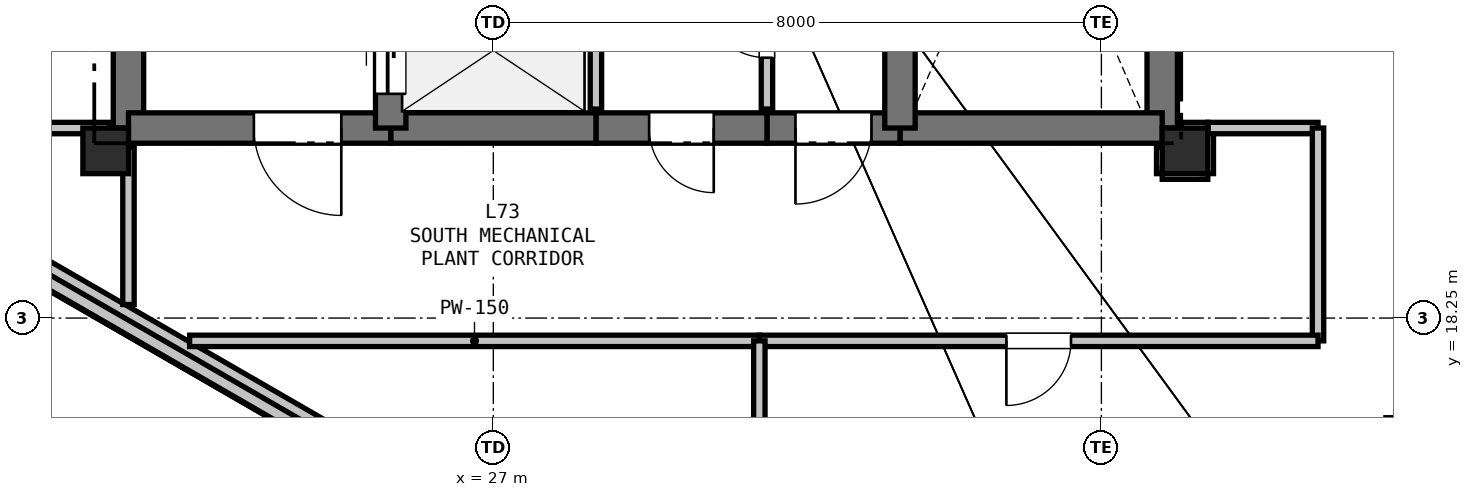
"""IFC4 building model, lengths in metres.
Left out: names, types, materials, properties, quantities, classifications, styles, units other than length and angle.
Written with IfcOpenShell. Run it as: python <this file> out.ifc"""

import sys

from ifc_helpers import new_model, si_unit, direction, frame, frame_2d, origin, origin_2d, place, context, subcontext, project, spatial, rectangle, extrude, element, fill, save


model = new_model("IFC4")
c1 = context("Model", 3, precision=1e-05, world=origin(), true_north=direction((0.0, 1.0)))
c2 = subcontext(c1, "Body", "Model", "MODEL_VIEW")
j1 = project(units=[si_unit("LENGTHUNIT", "METRE"), si_unit("PLANEANGLEUNIT", "RADIAN")], contexts=[c1])
p1 = place(None, origin())
s1 = spatial("IfcSite", under=j1, at=p1, CompositionType="ELEMENT")
p2 = place(p1, origin())
s2 = spatial("IfcBuilding", under=s1, at=p2, CompositionType="ELEMENT")
p3 = place(p2, frame((0.0, 0.0, 264.0)))
s3 = spatial("IfcBuildingStorey", under=s2, at=p3, CompositionType="ELEMENT", Elevation=264.0)
for number, where, z_axis, x_axis in (
    (1, (21.9, 20.45, 0.0), (0.0, 0.0, 1.0), (1.0, 0.0, 0.0)),
    (2, (36.1, 20.45, 0.0), (0.0, 0.0, 1.0), (1.0, 0.0, 0.0)),
):
    element("IfcColumn", number, at=place(p3, frame(where, z_axis=z_axis, x_axis=x_axis)), inside=s3, PredefinedType="COLUMN", context=c2, shape_type="SweptSolid", body=[
        extrude(rectangle(XDim=0.6, YDim=0.6, at=origin_2d()), origin(), (0.0, 0.0, 1.0), 2.6),
    ])
p4 = place(p3, frame((36.525, 10.0, 0.0), z_axis=(0.0, 0.0, 1.0), x_axis=(-0.866023553042, 0.500003205566, 0.0)))
e3 = element("IfcWall", 3, at=p4, inside=s3, PredefinedType="SOLIDWALL", context=c2, shape_type="SweptSolid", body=[
    extrude(rectangle(XDim=29.783, YDim=0.225, at=frame_2d((14.892, 0.0))), origin(), (0.0, 0.0, 1.0), 2.25),
])
p5 = place(p3, frame((36.525, 9.851, 2.7), z_axis=(0.0, 0.0, 1.0), x_axis=(-0.866024093284, 0.500002269847, 0.0)))
e4 = element("IfcWall", 4, at=p5, inside=s3, PredefinedType="PARAPET", context=c2, shape_type="SweptSolid", body=[
    extrude(rectangle(XDim=29.933, YDim=0.175, at=frame_2d((14.967, 0.0))), origin(), (0.0, 0.0, 1.0), 1.2),
])
p6 = place(p3, frame((22.2, 20.75, 0.0), z_axis=(0.0, 0.0, 1.0), x_axis=(0.0, 1.0, 0.0)))
e5 = element("IfcWall", 5, at=p6, inside=s3, PredefinedType="SHEAR", context=c2, shape_type="SweptSolid", body=[
    extrude(rectangle(XDim=4.65, YDim=0.4, at=frame_2d((2.325, 0.0))), origin(), (0.0, 0.0, 1.0), 2.6),
])
p7 = place(p3, frame((35.8, 28.1, 0.0), z_axis=(0.0, 0.0, 1.0), x_axis=(0.0, -1.0, 0.0)))
e6 = element("IfcWall", 6, at=p7, inside=s3, PredefinedType="SHEAR", context=c2, shape_type="SweptSolid", body=[
    extrude(rectangle(XDim=7.35, YDim=0.4, at=frame_2d((3.675, 0.0))), origin(), (0.0, 0.0, 1.0), 2.6),
])
p8 = place(p3, frame((35.8, 20.75, 0.0), z_axis=(0.0, 0.0, 1.0), x_axis=(-1.0, 0.0, 0.0)))
e7 = element("IfcWall", 7, at=p8, inside=s3, PredefinedType="SHEAR", context=c2, shape_type="SweptSolid", body=[
    extrude(rectangle(XDim=3.45, YDim=0.4, at=frame_2d((1.725, 0.0))), origin(), (0.0, 0.0, 1.0), 2.6),
])
p9 = place(p3, frame((32.35, 20.75, 0.0), z_axis=(0.0, 0.0, 1.0), x_axis=(-1.0, 0.0, 0.0)))
e8 = element("IfcWall", 8, at=p9, inside=s3, PredefinedType="SHEAR", context=c2, shape_type="SweptSolid", body=[
    extrude(rectangle(XDim=1.75, YDim=0.4, at=frame_2d((0.875, 0.0))), origin(), (0.0, 0.0, 1.0), 2.6),
])
p10 = place(p9, frame((0.375, 0.0, 0.0)))
e9 = element("IfcOpeningElement", 9, at=p10, cuts=e8, PredefinedType="OPENING", context=c2, shape_type="SweptSolid", body=[
    extrude(rectangle(XDim=1.0, YDim=2.15, at=frame_2d((0.5, 1.075))), frame((0.0, 0.21, 0.0), z_axis=(0.0, -1.0, 0.0), x_axis=(1.0, 0.0, 0.0)), (0.0, 0.0, 1.0), 0.42),
])
p11 = place(p3, frame((30.6, 20.75, 0.0), z_axis=(0.0, 0.0, 1.0), x_axis=(-1.0, 0.0, 0.0)))
e10 = element("IfcWall", 10, at=p11, inside=s3, PredefinedType="SHEAR", context=c2, shape_type="SweptSolid", body=[
    extrude(rectangle(XDim=2.25, YDim=0.4, at=frame_2d((1.125, 0.0))), origin(), (0.0, 0.0, 1.0), 2.6),
])
p12 = place(p11, frame((0.7, 0.0, 0.0)))
e11 = element("IfcOpeningElement", 11, at=p12, cuts=e10, PredefinedType="OPENING", context=c2, shape_type="SweptSolid", body=[
    extrude(rectangle(XDim=0.85, YDim=2.1, at=frame_2d((0.425, 1.05))), frame((0.0, 0.21, 0.0), z_axis=(0.0, -1.0, 0.0), x_axis=(1.0, 0.0, 0.0)), (0.0, 0.0, 1.0), 0.42),
])
p13 = place(p3, frame((28.35, 20.75, 0.0), z_axis=(0.0, 0.0, 1.0), x_axis=(-1.0, 0.0, 0.0)))
e12 = element("IfcWall", 12, at=p13, inside=s3, PredefinedType="SHEAR", context=c2, shape_type="SweptSolid", body=[
    extrude(rectangle(XDim=2.7, YDim=0.4, at=frame_2d((1.35, 0.0))), origin(), (0.0, 0.0, 1.0), 2.6),
])
p14 = place(p3, frame((25.65, 20.75, 0.0), z_axis=(0.0, 0.0, 1.0), x_axis=(-1.0, 0.0, 0.0)))
e13 = element("IfcWall", 13, at=p14, inside=s3, PredefinedType="SHEAR", context=c2, shape_type="SweptSolid", body=[
    extrude(rectangle(XDim=3.45, YDim=0.4, at=frame_2d((1.725, 0.0))), origin(), (0.0, 0.0, 1.0), 2.6),
])
p15 = place(p14, frame((0.65, 0.0, 0.0)))
e14 = element("IfcOpeningElement", 14, at=p15, cuts=e13, PredefinedType="OPENING", context=c2, shape_type="SweptSolid", body=[
    extrude(rectangle(XDim=1.15, YDim=2.15, at=frame_2d((0.575, 1.075))), frame((0.0, 0.21, 0.0), z_axis=(0.0, -1.0, 0.0), x_axis=(1.0, 0.0, 0.0)), (0.0, 0.0, 1.0), 0.42),
])
p16 = place(p3, frame((25.65, 20.75, 0.0), z_axis=(0.0, 0.0, 1.0), x_axis=(0.0, 1.0, 0.0)))
e15 = element("IfcWall", 15, at=p16, inside=s3, PredefinedType="SHEAR", context=c2, shape_type="SweptSolid", body=[
    extrude(rectangle(XDim=2.0, YDim=0.4, at=frame_2d((1.0, 0.0))), origin(), (0.0, 0.0, 1.0), 2.6),
])
p17 = place(p16, frame((0.45, 0.0, 0.0)))
e16 = element("IfcOpeningElement", 16, at=p17, cuts=e15, PredefinedType="OPENING", context=c2, shape_type="SweptSolid", body=[
    extrude(rectangle(XDim=1.1, YDim=2.15, at=frame_2d((0.55, 1.075))), frame((0.0, 0.21, 0.0), z_axis=(0.0, -1.0, 0.0), x_axis=(1.0, 0.0, 0.0)), (0.0, 0.0, 1.0), 0.42),
])
p18 = place(p3, frame((32.35, 20.75, 0.0), z_axis=(0.0, 0.0, 1.0), x_axis=(0.0, 1.0, 0.0)))
e17 = element("IfcWall", 17, at=p18, inside=s3, PredefinedType="SHEAR", context=c2, shape_type="SweptSolid", body=[
    extrude(rectangle(XDim=4.8, YDim=0.4, at=frame_2d((2.4, 0.0))), origin(), (0.0, 0.0, 1.0), 2.6),
])
p19 = place(p3, frame((28.35, 23.2, 0.0), z_axis=(0.0, 0.0, 1.0), x_axis=(0.0, -1.0, 0.0)))
e18 = element("IfcWall", 18, at=p19, inside=s3, PredefinedType="PARTITIONING", context=c2, shape_type="SweptSolid", body=[
    extrude(rectangle(XDim=2.2, YDim=0.15, at=frame_2d((1.1, 0.0))), origin(), (0.0, 0.0, 1.0), 2.6),
])
p20 = place(p3, frame((30.6, 21.0, 0.0), z_axis=(0.0, 0.0, 1.0), x_axis=(0.0, 1.0, 0.0)))
e19 = element("IfcWall", 19, at=p20, inside=s3, PredefinedType="PARTITIONING", context=c2, shape_type="SweptSolid", body=[
    extrude(rectangle(XDim=2.2, YDim=0.15, at=frame_2d((1.1, 0.0))), origin(), (0.0, 0.0, 1.0), 2.6),
])
p21 = place(p20, frame((0.675, 0.0, 0.0)))
e20 = element("IfcOpeningElement", 20, at=p21, cuts=e19, PredefinedType="OPENING", context=c2, shape_type="SweptSolid", body=[
    extrude(rectangle(XDim=0.85, YDim=2.1, at=frame_2d((0.425, 1.05))), frame((0.0, 0.085, 0.0), z_axis=(0.0, -1.0, 0.0), x_axis=(1.0, 0.0, 0.0)), (0.0, 0.0, 1.0), 0.17),
])
p22 = place(p3, frame((35.8, 20.5, 0.0), z_axis=(0.0, 0.0, 1.0), x_axis=(0.0, -1.0, 0.0)))
e21 = element("IfcWall", 21, at=p22, inside=s3, PredefinedType="PARTITIONING", context=c2, shape_type="SweptSolid", body=[
    extrude(rectangle(XDim=0.35, YDim=0.15, at=frame_2d((0.175, 0.0))), origin(), (0.0, 0.0, 1.0), 2.6),
])
p23 = place(p3, frame((35.8, 20.15, 0.0), z_axis=(0.0, 0.0, 1.0), x_axis=(1.0, 0.0, 0.0)))
e22 = element("IfcWall", 22, at=p23, inside=s3, PredefinedType="PARTITIONING", context=c2, shape_type="SweptSolid", body=[
    extrude(rectangle(XDim=0.6, YDim=0.15, at=frame_2d((0.3, 0.0))), origin(), (0.0, 0.0, 1.0), 2.6),
])
p24 = place(p3, frame((36.4, 20.15, 0.0), z_axis=(0.0, 0.0, 1.0), x_axis=(0.0, 1.0, 0.0)))
e23 = element("IfcWall", 23, at=p24, inside=s3, PredefinedType="PARTITIONING", context=c2, shape_type="SweptSolid", body=[
    extrude(rectangle(XDim=0.6, YDim=0.15, at=frame_2d((0.3, 0.0))), origin(), (0.0, 0.0, 1.0), 2.6),
])
p25 = place(p3, frame((36.4, 20.75, 0.0), z_axis=(0.0, 0.0, 1.0), x_axis=(1.0, 0.0, 0.0)))
e24 = element("IfcWall", 24, at=p25, inside=s3, PredefinedType="PARTITIONING", context=c2, shape_type="SweptSolid", body=[
    extrude(rectangle(XDim=1.45, YDim=0.15, at=frame_2d((0.725, 0.0))), origin(), (0.0, 0.0, 1.0), 2.6),
])
p26 = place(p3, frame((37.85, 20.75, 0.0), z_axis=(0.0, 0.0, 1.0), x_axis=(0.0, -1.0, 0.0)))
e25 = element("IfcWall", 25, at=p26, inside=s3, PredefinedType="PARTITIONING", context=c2, shape_type="SweptSolid", body=[
    extrude(rectangle(XDim=2.8, YDim=0.15, at=frame_2d((1.4, 0.0))), origin(), (0.0, 0.0, 1.0), 2.6),
])
p27 = place(p3, frame((37.85, 17.95, 0.0), z_axis=(0.0, 0.0, 1.0), x_axis=(-1.0, 0.0, 0.0)))
e26 = element("IfcWall", 26, at=p27, inside=s3, PredefinedType="PARTITIONING", context=c2, shape_type="SweptSolid", body=[
    extrude(rectangle(XDim=7.35, YDim=0.15, at=frame_2d((3.675, 0.0))), origin(), (0.0, 0.0, 1.0), 2.6),
])
p28 = place(p27, frame((3.25, 0.0, 0.0)))
e27 = element("IfcOpeningElement", 27, at=p28, cuts=e26, PredefinedType="OPENING", context=c2, shape_type="SweptSolid", body=[
    extrude(rectangle(XDim=0.85, YDim=2.1, at=frame_2d((0.425, 1.05))), frame((0.0, 0.085, 0.0), z_axis=(0.0, -1.0, 0.0), x_axis=(1.0, 0.0, 0.0)), (0.0, 0.0, 1.0), 0.17),
])
p29 = place(p3, frame((30.5, 17.95, 0.0), z_axis=(0.0, 0.0, 1.0), x_axis=(-1.0, 0.0, 0.0)))
e28 = element("IfcWall", 28, at=p29, inside=s3, PredefinedType="PARTITIONING", context=c2, shape_type="SweptSolid", body=[
    extrude(rectangle(XDim=7.495, YDim=0.15, at=frame_2d((3.748, 0.0))), origin(), (0.0, 0.0, 1.0), 2.105),
])
p30 = place(p3, frame((22.2, 18.429, 0.0), z_axis=(0.0, 0.0, 1.0), x_axis=(0.0, 1.0, 0.0)))
e29 = element("IfcWall", 29, at=p30, inside=s3, PredefinedType="PARTITIONING", context=c2, shape_type="SweptSolid", body=[
    extrude(rectangle(XDim=2.071, YDim=0.15, at=frame_2d((1.036, 0.0))), origin(), (0.0, 0.0, 1.0), 2.105),
])
p31 = place(p3, frame((21.95, 20.75, 0.0), z_axis=(0.0, 0.0, 1.0), x_axis=(-1.0, 0.0, 0.0)))
e30 = element("IfcWall", 30, at=p31, inside=s3, PredefinedType="PARTITIONING", context=c2, shape_type="SweptSolid", body=[
    extrude(rectangle(XDim=1.45, YDim=0.15, at=frame_2d((0.725, 0.0))), origin(), (0.0, 0.0, 1.0), 2.6),
])
p32 = place(p3, frame((30.5, 13.637, 0.0), z_axis=(0.0, 0.0, 1.0), x_axis=(0.0, 1.0, 0.0)))
e31 = element("IfcWall", 31, at=p32, inside=s3, PredefinedType="PARTITIONING", context=c2, shape_type="SweptSolid", body=[
    extrude(rectangle(XDim=4.313, YDim=0.15, at=frame_2d((2.156, 0.0))), origin(), (0.0, 0.0, 1.0), 2.105),
])
p33 = place(p3, frame((36.4, 20.75, 0.0), z_axis=(0.0, 0.0, 1.0), x_axis=(-1.0, 0.0, 0.0)))
e32 = element("IfcWall", 32, at=p33, inside=s3, PredefinedType="PARTITIONING", context=c2, shape_type="SweptSolid", body=[
    extrude(rectangle(XDim=0.35, YDim=0.15, at=frame_2d((0.175, 0.0))), origin(), (0.0, 0.0, 1.0), 2.6),
])
p34 = place(p10, origin())
e33 = element("IfcDoor", 33, at=p34, inside=s3, OperationType="SINGLE_SWING_RIGHT", PredefinedType="DOOR", context=c2, shape_type="SweptSolid", body=[
    extrude(rectangle(XDim=1.0, YDim=2.15, at=frame_2d((0.5, 1.075))), frame((0.0, 0.025, 0.0), z_axis=(0.0, -1.0, 0.0), x_axis=(1.0, 0.0, 0.0)), (0.0, 0.0, 1.0), 0.05),
])
fill(e9, e33)
p35 = place(p17, origin())
e34 = element("IfcDoor", 34, at=p35, inside=s3, OperationType="SLIDING_TO_LEFT", PredefinedType="DOOR", context=c2, shape_type="SweptSolid", body=[
    extrude(rectangle(XDim=1.1, YDim=2.15, at=frame_2d((0.55, 1.075))), frame((0.0, 0.025, 0.0), z_axis=(0.0, -1.0, 0.0), x_axis=(1.0, 0.0, 0.0)), (0.0, 0.0, 1.0), 0.05),
])
fill(e16, e34)
p36 = place(p15, origin())
e35 = element("IfcDoor", 35, at=p36, inside=s3, OperationType="SINGLE_SWING_LEFT", PredefinedType="DOOR", context=c2, shape_type="SweptSolid", body=[
    extrude(rectangle(XDim=1.15, YDim=2.15, at=frame_2d((0.575, 1.075))), frame((0.0, 0.025, 0.0), z_axis=(0.0, -1.0, 0.0), x_axis=(1.0, 0.0, 0.0)), (0.0, 0.0, 1.0), 0.05),
])
fill(e14, e35)
p37 = place(p21, origin())
e36 = element("IfcDoor", 36, at=p37, inside=s3, OperationType="SINGLE_SWING_RIGHT", PredefinedType="DOOR", context=c2, shape_type="SweptSolid", body=[
    extrude(rectangle(XDim=0.85, YDim=2.1, at=frame_2d((0.425, 1.05))), frame((0.0, 0.025, 0.0), z_axis=(0.0, -1.0, 0.0), x_axis=(1.0, 0.0, 0.0)), (0.0, 0.0, 1.0), 0.05),
])
fill(e20, e36)
p38 = place(p12, origin())
e37 = element("IfcDoor", 37, at=p38, inside=s3, OperationType="SINGLE_SWING_LEFT", PredefinedType="DOOR", context=c2, shape_type="SweptSolid", body=[
    extrude(rectangle(XDim=0.85, YDim=2.1, at=frame_2d((0.425, 1.05))), frame((0.0, 0.025, 0.0), z_axis=(0.0, -1.0, 0.0), x_axis=(1.0, 0.0, 0.0)), (0.0, 0.0, 1.0), 0.05),
])
fill(e11, e37)
p39 = place(p28, origin())
e38 = element("IfcDoor", 38, at=p39, inside=s3, OperationType="SINGLE_SWING_RIGHT", PredefinedType="DOOR", context=c2, shape_type="SweptSolid", body=[
    extrude(rectangle(XDim=0.85, YDim=2.1, at=frame_2d((0.425, 1.05))), frame((0.0, 0.025, 0.0), z_axis=(0.0, -1.0, 0.0), x_axis=(1.0, 0.0, 0.0)), (0.0, 0.0, 1.0), 0.05),
])
fill(e27, e38)
save(model, sys.argv[1])
